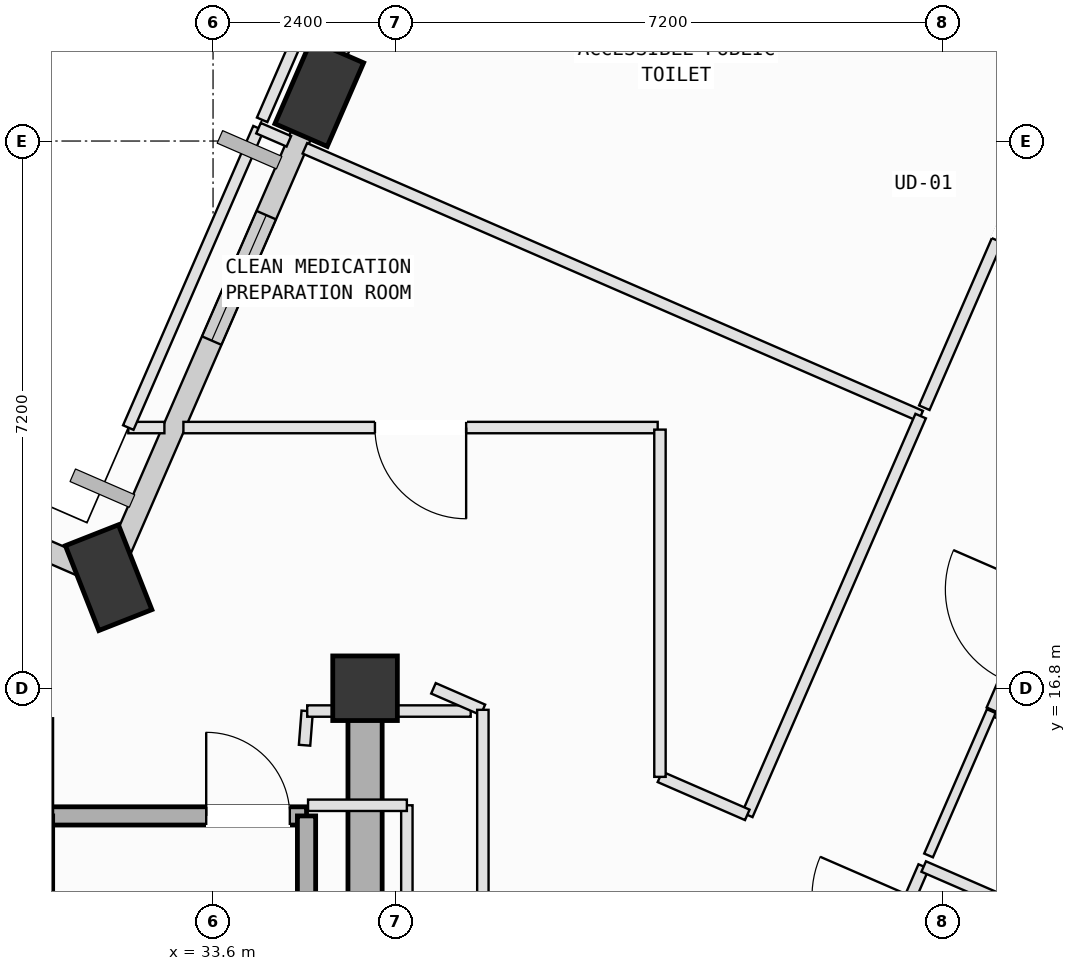
"""IFC4 building model, lengths in metres.
Left out: names, types, materials, properties, quantities, classifications, styles, units other than length and angle.
Written with IfcOpenShell. Run it as: python <this file> out.ifc"""

import sys

from ifc_helpers import new_model, si_unit, direction, frame, frame_2d, origin, origin_2d, place, context, subcontext, project, spatial, rectangle, extrude, element, fill, save


model = new_model("IFC4")
c1 = context("Model", 3, precision=1e-05, world=origin(), true_north=direction((0.0, 1.0)))
c2 = subcontext(c1, "Body", "Model", "MODEL_VIEW")
j1 = project(units=[si_unit("LENGTHUNIT", "METRE"), si_unit("PLANEANGLEUNIT", "RADIAN")], contexts=[c1])
p1 = place(None, origin())
s1 = spatial("IfcSite", under=j1, at=p1, CompositionType="ELEMENT")
p2 = place(p1, origin())
s2 = spatial("IfcBuilding", under=s1, at=p2, CompositionType="ELEMENT")
p3 = place(p2, frame((0.0, 0.0, 324.6)))
s3 = spatial("IfcBuildingStorey", under=s2, at=p3, CompositionType="ELEMENT", Elevation=324.6)
p4 = place(p3, frame((35.6, 16.8, 0.0), z_axis=(0.0, 0.0, 1.0), x_axis=(1.0, 0.0, 0.0)))
e1 = element("IfcColumn", 1, at=p4, inside=s3, PredefinedType="COLUMN", context=c2, shape_type="SweptSolid", body=[
    extrude(rectangle(XDim=0.85, YDim=0.85, at=origin_2d()), origin(), (0.0, 0.0, 1.0), 4.0),
])
for number, where, z_axis, x_axis in (
    (2, (34.998, 24.628, 0.002), (0.0, 0.0, 1.0), (0.399, 0.917, 0.0)),
    (3, (32.226, 18.255, 0.002), (0.0, 0.0, 1.0), (-0.367, 0.93, 0.0)),
):
    element("IfcColumn", number, at=place(p3, frame(where, z_axis=z_axis, x_axis=x_axis)), inside=s3, PredefinedType="COLUMN", context=c2, shape_type="SweptSolid", body=[
        extrude(rectangle(XDim=1.2, YDim=0.75, at=origin_2d()), origin(), (0.0, 0.0, 1.0), 3.996),
    ])
p5 = place(p3, frame((35.156, 24.993, 0.0), z_axis=(0.0, 0.0, 1.0), x_axis=(0.398758169539, 0.917056117272, 0.0)))
e4 = element("IfcWall", 4, at=p5, inside=s3, PredefinedType="SOLIDWALL", context=c2, shape_type="SweptSolid", body=[
    extrude(rectangle(XDim=6.405, YDim=0.28, at=frame_2d((3.202, 0.0))), origin(), (0.0, 0.0, 1.0), 3.265),
])
p6 = place(p5, frame((1.547, 0.0, 0.75)))
e5 = element("IfcOpeningElement", 5, at=p6, cuts=e4, PredefinedType="OPENING", context=c2, shape_type="SweptSolid", body=[
    extrude(rectangle(XDim=1.4, YDim=1.85, at=frame_2d((0.7, 0.925))), frame((0.0, 0.15, 0.0), z_axis=(0.0, -1.0, 0.0), x_axis=(1.0, 0.0, 0.0)), (0.0, 0.0, 1.0), 0.3),
])
p7 = place(p3, frame((32.385, 18.619, 0.0), z_axis=(0.0, 0.0, 1.0), x_axis=(0.398753668733, 0.917058074318, 0.0)))
e6 = element("IfcWall", 6, at=p7, inside=s3, PredefinedType="SOLIDWALL", context=c2, shape_type="SweptSolid", body=[
    extrude(rectangle(XDim=6.155, YDim=0.28, at=frame_2d((3.078, 0.0))), origin(), (0.0, 0.0, 1.0), 3.265),
])
p8 = place(p7, frame((3.004, 0.0, 0.75)))
e7 = element("IfcOpeningElement", 7, at=p8, cuts=e6, PredefinedType="OPENING", context=c2, shape_type="SweptSolid", body=[
    extrude(rectangle(XDim=1.8, YDim=2.05, at=frame_2d((0.9, 1.025))), frame((0.0, 0.15, 0.0), z_axis=(0.0, -1.0, 0.0), x_axis=(1.0, 0.0, 0.0)), (0.0, 0.0, 1.0), 0.3),
])
p9 = place(p3, frame((25.484, 21.187, 0.0), z_axis=(0.0, 0.0, 1.0), x_axis=(0.917060568388, -0.398747932794, 0.0)))
e8 = element("IfcWall", 8, at=p9, inside=s3, PredefinedType="SOLIDWALL", context=c2, shape_type="SweptSolid", body=[
    extrude(rectangle(XDim=6.955, YDim=0.28, at=frame_2d((3.478, 0.0))), origin(), (0.0, 0.0, 1.0), 2.765),
])
p10 = place(p3, frame((31.37, 15.12, 0.0), z_axis=(0.0, 0.0, 1.0), x_axis=(1.0, 0.0, 0.0)))
e9 = element("IfcWall", 9, at=p10, inside=s3, PredefinedType="SOLIDWALL", context=c2, shape_type="SweptSolid", body=[
    extrude(rectangle(XDim=3.46, YDim=0.24, at=frame_2d((1.73, 0.0))), origin(), (0.0, 0.0, 1.0), 3.78),
])
p11 = place(p10, frame((2.14, 0.0, 0.0)))
e10 = element("IfcOpeningElement", 10, at=p11, cuts=e9, PredefinedType="OPENING", context=c2, shape_type="SweptSolid", body=[
    extrude(rectangle(XDim=1.1, YDim=2.15, at=frame_2d((0.55, 1.075))), frame((0.0, 0.13, 0.0), z_axis=(0.0, -1.0, 0.0), x_axis=(1.0, 0.0, 0.0)), (0.0, 0.0, 1.0), 0.26),
])
for number, where, z_axis, x_axis in (
    (11, (34.83, 15.12, 0.0), (0.0, 0.0, 1.0), (0.0, -1.0, 0.0)),
    (12, (31.37, 8.025, 0.0), (0.0, 0.0, 1.0), (0.0, 1.0, 0.0)),
):
    element("IfcWall", number, at=place(p3, frame(where, z_axis=z_axis, x_axis=x_axis)), inside=s3, PredefinedType="SOLIDWALL", context=c2, shape_type="SweptSolid", body=[
        extrude(rectangle(XDim=7.095, YDim=0.24, at=frame_2d((3.548, 0.0))), origin(), (0.0, 0.0, 1.0), 3.78),
    ])
p12 = place(p3, frame((35.6, 7.8, 0.0), z_axis=(0.0, 0.0, 1.0), x_axis=(0.0, 1.0, 0.0)))
e13 = element("IfcWall", 13, at=p12, inside=s3, PredefinedType="SHEAR", context=c2, shape_type="SweptSolid", body=[
    extrude(rectangle(XDim=9.0, YDim=0.45, at=frame_2d((4.5, 0.0))), origin(), (0.0, 0.0, 1.0), 3.78),
])
p13 = place(p3, frame((42.093, 12.482, 0.0), z_axis=(0.0, 0.0, 1.0), x_axis=(0.398518519728, 0.917160285574, 0.0)))
e14 = element("IfcWall", 14, at=p13, inside=s3, PredefinedType="PARTITIONING", context=c2, shape_type="SweptSolid", body=[
    extrude(rectangle(XDim=2.15, YDim=0.15, at=frame_2d((1.075, 0.0))), origin(), (0.0, 0.0, 1.0), 3.78),
])
p14 = place(p13, frame((0.425, 0.0, 0.0)))
e15 = element("IfcOpeningElement", 15, at=p14, cuts=e14, PredefinedType="OPENING", context=c2, shape_type="SweptSolid", body=[
    extrude(rectangle(XDim=1.3, YDim=2.15, at=frame_2d((0.65, 1.075))), frame((0.0, 0.085, 0.0), z_axis=(0.0, -1.0, 0.0), x_axis=(1.0, 0.0, 0.0)), (0.0, 0.0, 1.0), 0.17),
])
p15 = place(p3, frame((42.95, 14.454, 0.0), z_axis=(0.0, 0.0, 1.0), x_axis=(0.917043017742, -0.398788294224, 0.0)))
e16 = element("IfcWall", 16, at=p15, inside=s3, PredefinedType="PARTITIONING", context=c2, shape_type="SweptSolid", body=[
    extrude(rectangle(XDim=7.465, YDim=0.15, at=frame_2d((3.733, 0.0))), origin(), (0.0, 0.0, 1.0), 3.78),
])
p16 = place(p3, frame((45.802, 15.661, 0.0), z_axis=(0.0, 0.0, 1.0), x_axis=(-0.916010257987, 0.401154842003, 0.0)))
e17 = element("IfcWall", 17, at=p16, inside=s3, PredefinedType="PARTITIONING", context=c2, shape_type="SweptSolid", body=[
    extrude(rectangle(XDim=2.134, YDim=0.15, at=frame_2d((1.067, 0.0))), origin(), (0.0, 0.0, 1.0), 3.78),
])
p17 = place(p16, frame((0.592, 0.0, 0.0)))
e18 = element("IfcOpeningElement", 18, at=p17, cuts=e17, PredefinedType="OPENING", context=c2, shape_type="SweptSolid", body=[
    extrude(rectangle(XDim=0.95, YDim=2.1, at=frame_2d((0.475, 1.05))), frame((0.0, 0.085, 0.0), z_axis=(0.0, -1.0, 0.0), x_axis=(1.0, 0.0, 0.0)), (0.0, 0.0, 1.0), 0.17),
])
p18 = place(p3, frame((43.847, 16.517, 0.0), z_axis=(0.0, 0.0, 1.0), x_axis=(0.398655528378, 0.917100741301, 0.0)))
e19 = element("IfcWall", 19, at=p18, inside=s3, PredefinedType="PARTITIONING", context=c2, shape_type="SweptSolid", body=[
    extrude(rectangle(XDim=2.15, YDim=0.15, at=frame_2d((1.075, 0.0))), origin(), (0.0, 0.0, 1.0), 3.78),
])
p19 = place(p18, frame((0.425, 0.0, 0.0)))
e20 = element("IfcOpeningElement", 20, at=p19, cuts=e19, PredefinedType="OPENING", context=c2, shape_type="SweptSolid", body=[
    extrude(rectangle(XDim=1.3, YDim=2.15, at=frame_2d((0.65, 1.075))), frame((0.0, 0.085, 0.0), z_axis=(0.0, -1.0, 0.0), x_axis=(1.0, 0.0, 0.0)), (0.0, 0.0, 1.0), 0.17),
])
p20 = place(p3, frame((43.014, 14.6, 0.0), z_axis=(0.0, 0.0, 1.0), x_axis=(0.398553636867, 0.917145025904, 0.0)))
e21 = element("IfcWall", 21, at=p20, inside=s3, PredefinedType="PARTITIONING", context=c2, shape_type="SweptSolid", body=[
    extrude(rectangle(XDim=2.071, YDim=0.125, at=frame_2d((1.035, 0.0))), origin(), (0.0, 0.0, 1.0), 3.78),
])
p21 = place(p3, frame((34.804, 16.05, 0.0), z_axis=(0.0, 0.0, 1.0), x_axis=(0.077896068279, 0.996961484987, 0.0)))
e22 = element("IfcWall", 22, at=p21, inside=s3, PredefinedType="PARTITIONING", context=c2, shape_type="SweptSolid", body=[
    extrude(rectangle(XDim=0.451, YDim=0.15, at=frame_2d((0.226, 0.0))), origin(), (0.0, 0.0, 1.0), 3.78),
])
p22 = place(p3, frame((34.839, 16.5, 0.0), z_axis=(0.0, 0.0, 1.0), x_axis=(1.0, 0.0, 0.0)))
e23 = element("IfcWall", 23, at=p22, inside=s3, PredefinedType="PARTITIONING", context=c2, shape_type="SweptSolid", body=[
    extrude(rectangle(XDim=2.151, YDim=0.15, at=frame_2d((1.075, 0.0))), origin(), (0.0, 0.0, 1.0), 2.765),
])
p23 = place(p3, frame((36.5, 16.799, 0.0), z_axis=(0.0, 0.0, 1.0), x_axis=(0.916867333156, -0.399192050762, 0.0)))
e24 = element("IfcWall", 24, at=p23, inside=s3, PredefinedType="PARTITIONING", context=c2, shape_type="SweptSolid", body=[
    extrude(rectangle(XDim=0.709, YDim=0.15, at=frame_2d((0.354, 0.0))), origin(), (0.0, 0.0, 1.0), 3.78),
])
p24 = place(p3, frame((37.15, 16.516, 0.0), z_axis=(0.0, 0.0, 1.0), x_axis=(0.0, -1.0, 0.0)))
e25 = element("IfcWall", 25, at=p24, inside=s3, PredefinedType="PARTITIONING", context=c2, shape_type="SweptSolid", body=[
    extrude(rectangle(XDim=6.238, YDim=0.15, at=frame_2d((3.119, 0.0))), origin(), (0.0, 0.0, 1.0), 3.78),
])
p25 = place(p24, frame((2.58, 0.0, 0.0)))
e26 = element("IfcOpeningElement", 26, at=p25, cuts=e25, PredefinedType="OPENING", context=c2, shape_type="SweptSolid", body=[
    extrude(rectangle(XDim=1.0, YDim=2.12, at=frame_2d((0.5, 1.06))), frame((0.0, 0.085, 0.0), z_axis=(0.0, -1.0, 0.0), x_axis=(1.0, 0.0, 0.0)), (0.0, 0.0, 1.0), 0.17),
])
p26 = place(p3, frame((36.15, 10.712, 0.0), z_axis=(0.0, 0.0, 1.0), x_axis=(0.0, 1.0, 0.0)))
e27 = element("IfcWall", 27, at=p26, inside=s3, PredefinedType="PARTITIONING", context=c2, shape_type="SweptSolid", body=[
    extrude(rectangle(XDim=4.548, YDim=0.15, at=frame_2d((2.274, 0.0))), origin(), (0.0, 0.0, 1.0), 3.78),
])
p27 = place(p3, frame((36.15, 15.26, 0.0), z_axis=(0.0, 0.0, 1.0), x_axis=(-1.0, 0.0, 0.0)))
e28 = element("IfcWall", 28, at=p27, inside=s3, PredefinedType="PARTITIONING", context=c2, shape_type="SweptSolid", body=[
    extrude(rectangle(XDim=1.3, YDim=0.15, at=frame_2d((0.65, 0.0))), origin(), (0.0, 0.0, 1.0), 3.78),
])
p28 = place(p3, frame((39.45, 20.23, 0.0), z_axis=(0.0, 0.0, 1.0), x_axis=(-1.0, 0.0, 0.0)))
e29 = element("IfcWall", 29, at=p28, inside=s3, PredefinedType="PARTITIONING", context=c2, shape_type="SweptSolid", body=[
    extrude(rectangle(XDim=6.24, YDim=0.15, at=frame_2d((3.12, 0.0))), origin(), (0.0, 0.0, 1.0), 3.78),
])
p29 = place(p28, frame((2.52, 0.0, 0.0)))
e30 = element("IfcOpeningElement", 30, at=p29, cuts=e29, PredefinedType="OPENING", context=c2, shape_type="SweptSolid", body=[
    extrude(rectangle(XDim=1.2, YDim=2.15, at=frame_2d((0.6, 1.075))), frame((0.0, 0.085, 0.0), z_axis=(0.0, -1.0, 0.0), x_axis=(1.0, 0.0, 0.0)), (0.0, 0.0, 1.0), 0.17),
])
p30 = place(p3, frame((32.96, 20.23, 0.0), z_axis=(0.0, 0.0, 1.0), x_axis=(-1.0, 0.0, 0.0)))
e31 = element("IfcWall", 31, at=p30, inside=s3, PredefinedType="PARTITIONING", context=c2, shape_type="SweptSolid", body=[
    extrude(rectangle(XDim=0.475, YDim=0.15, at=frame_2d((0.237, 0.0))), origin(), (0.0, 0.0, 1.0), 3.78),
])
p31 = place(p3, frame((32.485, 20.23, 0.0), z_axis=(0.0, 0.0, 1.0), x_axis=(0.398784305347, 0.917044752348, 0.0)))
e32 = element("IfcWall", 32, at=p31, inside=s3, PredefinedType="PARTITIONING", context=c2, shape_type="SweptSolid", body=[
    extrude(rectangle(XDim=4.295, YDim=0.15, at=frame_2d((2.147, 0.0))), origin(), (0.0, 0.0, 1.0), 3.78),
])
p32 = place(p3, frame((34.198, 24.169, 0.0), z_axis=(0.0, 0.0, 1.0), x_axis=(0.917569282622, -0.397575919276, 0.0)))
e33 = element("IfcWall", 33, at=p32, inside=s3, PredefinedType="PARTITIONING", context=c2, shape_type="SweptSolid", body=[
    extrude(rectangle(XDim=0.435, YDim=0.15, at=frame_2d((0.217, 0.0))), origin(), (0.0, 0.0, 1.0), 3.78),
])
p33 = place(p3, frame((34.808, 23.904, 0.0), z_axis=(0.0, 0.0, 1.0), x_axis=(0.917052481723, -0.398766530398, 0.0)))
e34 = element("IfcWall", 34, at=p33, inside=s3, PredefinedType="PARTITIONING", context=c2, shape_type="SweptSolid", body=[
    extrude(rectangle(XDim=8.835, YDim=0.15, at=frame_2d((4.417, 0.0))), origin(), (0.0, 0.0, 1.0), 3.78),
])
p34 = place(p3, frame((42.91, 20.381, 0.0), z_axis=(0.0, 0.0, 1.0), x_axis=(-0.398677741034, -0.917091085337, 0.0)))
e35 = element("IfcWall", 35, at=p34, inside=s3, PredefinedType="PARTITIONING", context=c2, shape_type="SweptSolid", body=[
    extrude(rectangle(XDim=5.721, YDim=0.15, at=frame_2d((2.861, 0.0))), origin(), (0.0, 0.0, 1.0), 3.78),
])
p35 = place(p3, frame((40.629, 15.134, 0.0), z_axis=(0.0, 0.0, 1.0), x_axis=(-0.916933705125, 0.399039572481, 0.0)))
e36 = element("IfcWall", 36, at=p35, inside=s3, PredefinedType="PARTITIONING", context=c2, shape_type="SweptSolid", body=[
    extrude(rectangle(XDim=1.253, YDim=0.15, at=frame_2d((0.626, 0.0))), origin(), (0.0, 0.0, 1.0), 3.78),
])
p36 = place(p3, frame((39.48, 15.634, 0.0), z_axis=(0.0, 0.0, 1.0), x_axis=(0.0, 1.0, 0.0)))
e37 = element("IfcWall", 37, at=p36, inside=s3, PredefinedType="PARTITIONING", context=c2, shape_type="SweptSolid", body=[
    extrude(rectangle(XDim=4.569, YDim=0.15, at=frame_2d((2.284, 0.0))), origin(), (0.0, 0.0, 1.0), 3.78),
])
p37 = place(p3, frame((45.239, 25.738, 0.0), z_axis=(0.0, 0.0, 1.0), x_axis=(-0.398677741034, -0.917091085337, 0.0)))
e38 = element("IfcWall", 38, at=p37, inside=s3, PredefinedType="PARTITIONING", context=c2, shape_type="SweptSolid", body=[
    extrude(rectangle(XDim=5.721, YDim=0.15, at=frame_2d((2.861, 0.0))), origin(), (0.0, 0.0, 1.0), 3.78),
])
p38 = place(p37, frame((2.401, 0.0, 0.0)))
e39 = element("IfcOpeningElement", 39, at=p38, cuts=e38, PredefinedType="OPENING", context=c2, shape_type="SweptSolid", body=[
    extrude(rectangle(XDim=0.92, YDim=2.1, at=frame_2d((0.46, 1.05))), frame((0.0, 0.085, 0.0), z_axis=(0.0, -1.0, 0.0), x_axis=(1.0, 0.0, 0.0)), (0.0, 0.0, 1.0), 0.17),
])
p39 = place(p3, frame((34.246, 24.279, 0.0), z_axis=(0.0, 0.0, 1.0), x_axis=(0.398693343221, 0.917084302598, 0.0)))
e40 = element("IfcWall", 40, at=p39, inside=s3, PredefinedType="PARTITIONING", context=c2, shape_type="SweptSolid", body=[
    extrude(rectangle(XDim=5.721, YDim=0.15, at=frame_2d((2.861, 0.0))), origin(), (0.0, 0.0, 1.0), 3.78),
])
p40 = place(p8, origin())
e41 = element("IfcWindow", 41, at=p40, inside=s3, PartitioningType="SINGLE_PANEL", PredefinedType="WINDOW", context=c2, shape_type="SweptSolid", body=[
    extrude(rectangle(XDim=1.8, YDim=2.05, at=frame_2d((0.9, 1.025))), frame((0.0, 0.03, 0.0), z_axis=(0.0, -1.0, 0.0), x_axis=(1.0, 0.0, 0.0)), (0.0, 0.0, 1.0), 0.06),
])
fill(e7, e41)
p41 = place(p11, origin())
e42 = element("IfcDoor", 42, at=p41, inside=s3, OperationType="SINGLE_SWING_LEFT", PredefinedType="DOOR", context=c2, shape_type="SweptSolid", body=[
    extrude(rectangle(XDim=1.1, YDim=2.15, at=frame_2d((0.55, 1.075))), frame((0.0, 0.025, 0.0), z_axis=(0.0, -1.0, 0.0), x_axis=(1.0, 0.0, 0.0)), (0.0, 0.0, 1.0), 0.05),
])
fill(e10, e42)
p42 = place(p29, origin())
e43 = element("IfcDoor", 43, at=p42, inside=s3, OperationType="SINGLE_SWING_LEFT", PredefinedType="DOOR", context=c2, shape_type="SweptSolid", body=[
    extrude(rectangle(XDim=1.2, YDim=2.15, at=frame_2d((0.6, 1.075))), frame((0.0, 0.025, 0.0), z_axis=(0.0, -1.0, 0.0), x_axis=(1.0, 0.0, 0.0)), (0.0, 0.0, 1.0), 0.05),
])
fill(e30, e43)
p43 = place(p38, origin())
e44 = element("IfcDoor", 44, at=p43, inside=s3, OperationType="SINGLE_SWING_LEFT", PredefinedType="DOOR", context=c2, shape_type="SweptSolid", body=[
    extrude(rectangle(XDim=0.92, YDim=2.1, at=frame_2d((0.46, 1.05))), frame((0.0, 0.025, 0.0), z_axis=(0.0, -1.0, 0.0), x_axis=(1.0, 0.0, 0.0)), (0.0, 0.0, 1.0), 0.05),
])
fill(e39, e44)
save(model, sys.argv[1])
